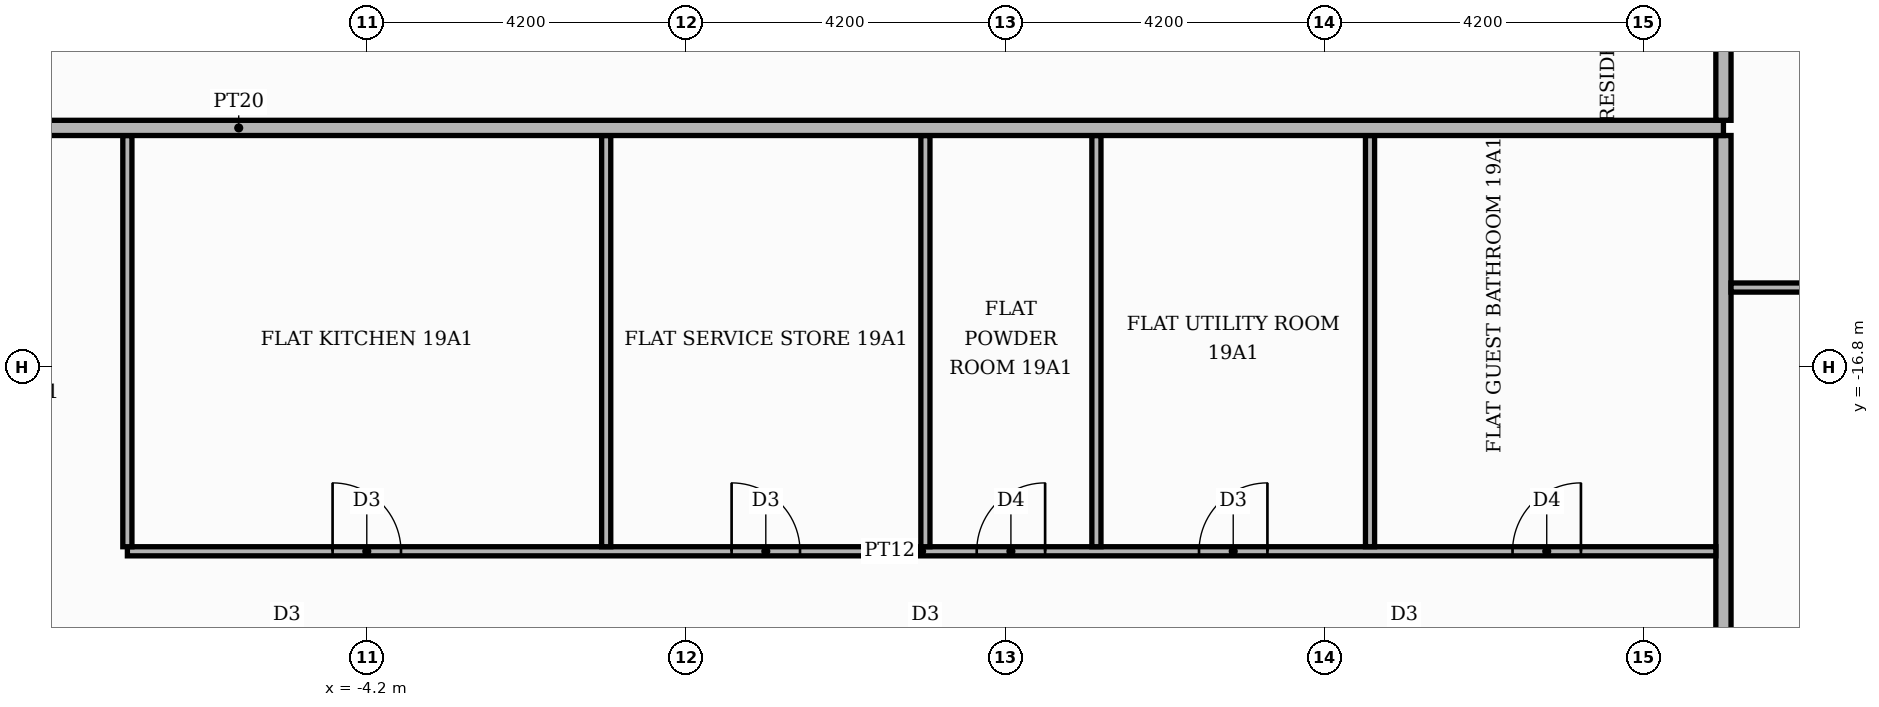
"""IFC4 building model, lengths in metres.
Left out: names, types, materials, properties, quantities, classifications, styles, units other than length and angle.
Written with IfcOpenShell. Run it as: python <this file> out.ifc"""

import sys

from ifc_helpers import new_model, si_unit, direction, frame, frame_2d, origin, place, context, subcontext, project, spatial, rectangle, extrude, element, fill, save


model = new_model("IFC4")
c1 = context("Model", 3, precision=1e-05, world=origin(), true_north=direction((0.0, 1.0)))
c2 = subcontext(c1, "Body", "Model", "MODEL_VIEW")
j1 = project(units=[si_unit("LENGTHUNIT", "METRE"), si_unit("PLANEANGLEUNIT", "RADIAN")], contexts=[c1])
p1 = place(None, origin())
s1 = spatial("IfcSite", under=j1, at=p1, CompositionType="ELEMENT")
p2 = place(p1, origin())
s2 = spatial("IfcBuilding", under=s1, at=p2, CompositionType="ELEMENT")
p3 = place(p2, frame((0.0, 0.0, 83.1)))
s3 = spatial("IfcBuildingStorey", under=s2, at=p3, CompositionType="ELEMENT", Elevation=83.1)
p4 = place(p3, frame((13.65, -25.42, 0.0), z_axis=(0.0, 0.0, 1.0), x_axis=(0.0, 1.0, 0.0)))
e1 = element("IfcWall", 1, at=p4, inside=s3, PredefinedType="PARTITIONING", context=c2, shape_type="SweptSolid", body=[
    extrude(rectangle(XDim=11.67, YDim=0.2, at=frame_2d((5.835, 0.0))), origin(), (0.0, 0.0, 1.0), 3.48),
])
p5 = place(p3, frame((-7.35, -19.22, 0.0), z_axis=(0.0, 0.0, 1.0), x_axis=(1.0, 0.0, 0.0)))
e2 = element("IfcWall", 2, at=p5, inside=s3, PredefinedType="PARTITIONING", context=c2, shape_type="SweptSolid", body=[
    extrude(rectangle(XDim=20.9, YDim=0.12, at=frame_2d((10.45, 0.0))), origin(), (0.0, 0.0, 1.0), 3.48),
])
p6 = place(p5, frame((2.7, 0.0, 0.0)))
e3 = element("IfcOpeningElement", 3, at=p6, cuts=e2, PredefinedType="OPENING", context=c2, shape_type="SweptSolid", body=[
    extrude(rectangle(XDim=0.9, YDim=2.1, at=frame_2d((0.45, 1.05))), frame((0.0, 0.07, 0.0), z_axis=(0.0, -1.0, 0.0), x_axis=(1.0, 0.0, 0.0)), (0.0, 0.0, 1.0), 0.14),
])
p7 = place(p5, frame((7.95, 0.0, 0.0)))
e4 = element("IfcOpeningElement", 4, at=p7, cuts=e2, PredefinedType="OPENING", context=c2, shape_type="SweptSolid", body=[
    extrude(rectangle(XDim=0.9, YDim=2.1, at=frame_2d((0.45, 1.05))), frame((0.0, 0.07, 0.0), z_axis=(0.0, -1.0, 0.0), x_axis=(1.0, 0.0, 0.0)), (0.0, 0.0, 1.0), 0.14),
])
p8 = place(p5, frame((11.175, 0.0, 0.0)))
e5 = element("IfcOpeningElement", 5, at=p8, cuts=e2, PredefinedType="OPENING", context=c2, shape_type="SweptSolid", body=[
    extrude(rectangle(XDim=0.9, YDim=2.1, at=frame_2d((0.45, 1.05))), frame((0.0, 0.07, 0.0), z_axis=(0.0, -1.0, 0.0), x_axis=(1.0, 0.0, 0.0)), (0.0, 0.0, 1.0), 0.14),
])
p9 = place(p5, frame((14.1, 0.0, 0.0)))
e6 = element("IfcOpeningElement", 6, at=p9, cuts=e2, PredefinedType="OPENING", context=c2, shape_type="SweptSolid", body=[
    extrude(rectangle(XDim=0.9, YDim=2.1, at=frame_2d((0.45, 1.05))), frame((0.0, 0.07, 0.0), z_axis=(0.0, -1.0, 0.0), x_axis=(1.0, 0.0, 0.0)), (0.0, 0.0, 1.0), 0.14),
])
p10 = place(p5, frame((18.225, 0.0, 0.0)))
e7 = element("IfcOpeningElement", 7, at=p10, cuts=e2, PredefinedType="OPENING", context=c2, shape_type="SweptSolid", body=[
    extrude(rectangle(XDim=0.9, YDim=2.1, at=frame_2d((0.45, 1.05))), frame((0.0, 0.07, 0.0), z_axis=(0.0, -1.0, 0.0), x_axis=(1.0, 0.0, 0.0)), (0.0, 0.0, 1.0), 0.14),
])
for number, where, z_axis, x_axis in (
    (8, (-7.35, -19.16, 0.0), (0.0, 0.0, 1.0), (0.0, 1.0, 0.0)),
    (9, (-1.05, -19.16, 0.0), (0.0, 0.0, 1.0), (0.0, 1.0, 0.0)),
    (10, (3.15, -19.16, 0.0), (0.0, 0.0, 1.0), (0.0, 1.0, 0.0)),
    (11, (5.4, -19.16, 0.0), (0.0, 0.0, 1.0), (0.0, 1.0, 0.0)),
    (12, (9.0, -19.16, 0.0), (0.0, 0.0, 1.0), (0.0, 1.0, 0.0)),
):
    element("IfcWall", number, at=place(p3, frame(where, z_axis=z_axis, x_axis=x_axis)), inside=s3, PredefinedType="PARTITIONING", context=c2, shape_type="SweptSolid", body=[
        extrude(rectangle(XDim=5.41, YDim=0.12, at=frame_2d((2.705, 0.0))), origin(), (0.0, 0.0, 1.0), 3.48),
    ])
p11 = place(p3, frame((13.75, -15.75, 0.0), z_axis=(0.0, 0.0, 1.0), x_axis=(1.0, 0.0, 0.0)))
e13 = element("IfcWall", 13, at=p11, inside=s3, PredefinedType="PARTITIONING", context=c2, shape_type="SweptSolid", body=[
    extrude(rectangle(XDim=6.37, YDim=0.12, at=frame_2d((3.185, 0.0))), origin(), (0.0, 0.0, 1.0), 3.48),
])
p12 = place(p11, frame((2.635, 0.0, 0.0)))
e14 = element("IfcOpeningElement", 14, at=p12, cuts=e13, PredefinedType="OPENING", context=c2, shape_type="SweptSolid", body=[
    extrude(rectangle(XDim=1.0, YDim=2.1, at=frame_2d((0.5, 1.05))), frame((0.0, 0.07, 0.0), z_axis=(0.0, -1.0, 0.0), x_axis=(1.0, 0.0, 0.0)), (0.0, 0.0, 1.0), 0.14),
])
p13 = place(p3, frame((-25.42, -13.65, 0.0), z_axis=(0.0, 0.0, 1.0), x_axis=(1.0, 0.0, 0.0)))
e15 = element("IfcWall", 15, at=p13, inside=s3, PredefinedType="PARTITIONING", context=c2, shape_type="SweptSolid", body=[
    extrude(rectangle(XDim=39.07, YDim=0.2, at=frame_2d((19.535, 0.0))), origin(), (0.0, 0.0, 1.0), 3.48),
])
p14 = place(p13, frame((14.37, 0.0, 0.0)))
e16 = element("IfcOpeningElement", 16, at=p14, cuts=e15, PredefinedType="OPENING", context=c2, shape_type="SweptSolid", body=[
    extrude(rectangle(XDim=1.1, YDim=2.4, at=frame_2d((0.55, 1.2))), frame((0.0, 0.11, 0.0), z_axis=(0.0, -1.0, 0.0), x_axis=(1.0, 0.0, 0.0)), (0.0, 0.0, 1.0), 0.22),
])
p15 = place(p3, frame((13.65, -13.55, 0.0), z_axis=(0.0, 0.0, 1.0), x_axis=(0.0, 1.0, 0.0)))
e17 = element("IfcWall", 17, at=p15, inside=s3, PredefinedType="PARTITIONING", context=c2, shape_type="SweptSolid", body=[
    extrude(rectangle(XDim=8.2, YDim=0.2, at=frame_2d((4.1, 0.0))), origin(), (0.0, 0.0, 1.0), 3.48),
])
p16 = place(p15, frame((1.45, 0.0, 0.0)))
e18 = element("IfcOpeningElement", 18, at=p16, cuts=e17, PredefinedType="OPENING", context=c2, shape_type="SweptSolid", body=[
    extrude(rectangle(XDim=1.1, YDim=2.4, at=frame_2d((0.55, 1.2))), frame((0.0, 0.11, 0.0), z_axis=(0.0, -1.0, 0.0), x_axis=(1.0, 0.0, 0.0)), (0.0, 0.0, 1.0), 0.22),
])
p17 = place(p6, origin())
e19 = element("IfcDoor", 19, at=p17, inside=s3, OperationType="SINGLE_SWING_LEFT", PredefinedType="DOOR", context=c2, shape_type="SweptSolid", body=[
    extrude(rectangle(XDim=0.9, YDim=2.1, at=frame_2d((0.45, 1.05))), frame((0.0, 0.025, 0.0), z_axis=(0.0, -1.0, 0.0), x_axis=(1.0, 0.0, 0.0)), (0.0, 0.0, 1.0), 0.05),
])
fill(e3, e19)
p18 = place(p7, origin())
e20 = element("IfcDoor", 20, at=p18, inside=s3, OperationType="SINGLE_SWING_LEFT", PredefinedType="DOOR", context=c2, shape_type="SweptSolid", body=[
    extrude(rectangle(XDim=0.9, YDim=2.1, at=frame_2d((0.45, 1.05))), frame((0.0, 0.025, 0.0), z_axis=(0.0, -1.0, 0.0), x_axis=(1.0, 0.0, 0.0)), (0.0, 0.0, 1.0), 0.05),
])
fill(e4, e20)
p19 = place(p8, origin())
e21 = element("IfcDoor", 21, at=p19, inside=s3, OperationType="SINGLE_SWING_RIGHT", PredefinedType="DOOR", context=c2, shape_type="SweptSolid", body=[
    extrude(rectangle(XDim=0.9, YDim=2.1, at=frame_2d((0.45, 1.05))), frame((0.0, 0.025, 0.0), z_axis=(0.0, -1.0, 0.0), x_axis=(1.0, 0.0, 0.0)), (0.0, 0.0, 1.0), 0.05),
])
fill(e5, e21)
p20 = place(p9, origin())
e22 = element("IfcDoor", 22, at=p20, inside=s3, OperationType="SINGLE_SWING_RIGHT", PredefinedType="DOOR", context=c2, shape_type="SweptSolid", body=[
    extrude(rectangle(XDim=0.9, YDim=2.1, at=frame_2d((0.45, 1.05))), frame((0.0, 0.025, 0.0), z_axis=(0.0, -1.0, 0.0), x_axis=(1.0, 0.0, 0.0)), (0.0, 0.0, 1.0), 0.05),
])
fill(e6, e22)
p21 = place(p10, origin())
e23 = element("IfcDoor", 23, at=p21, inside=s3, OperationType="SINGLE_SWING_RIGHT", PredefinedType="DOOR", context=c2, shape_type="SweptSolid", body=[
    extrude(rectangle(XDim=0.9, YDim=2.1, at=frame_2d((0.45, 1.05))), frame((0.0, 0.025, 0.0), z_axis=(0.0, -1.0, 0.0), x_axis=(1.0, 0.0, 0.0)), (0.0, 0.0, 1.0), 0.05),
])
fill(e7, e23)
save(model, sys.argv[1])
